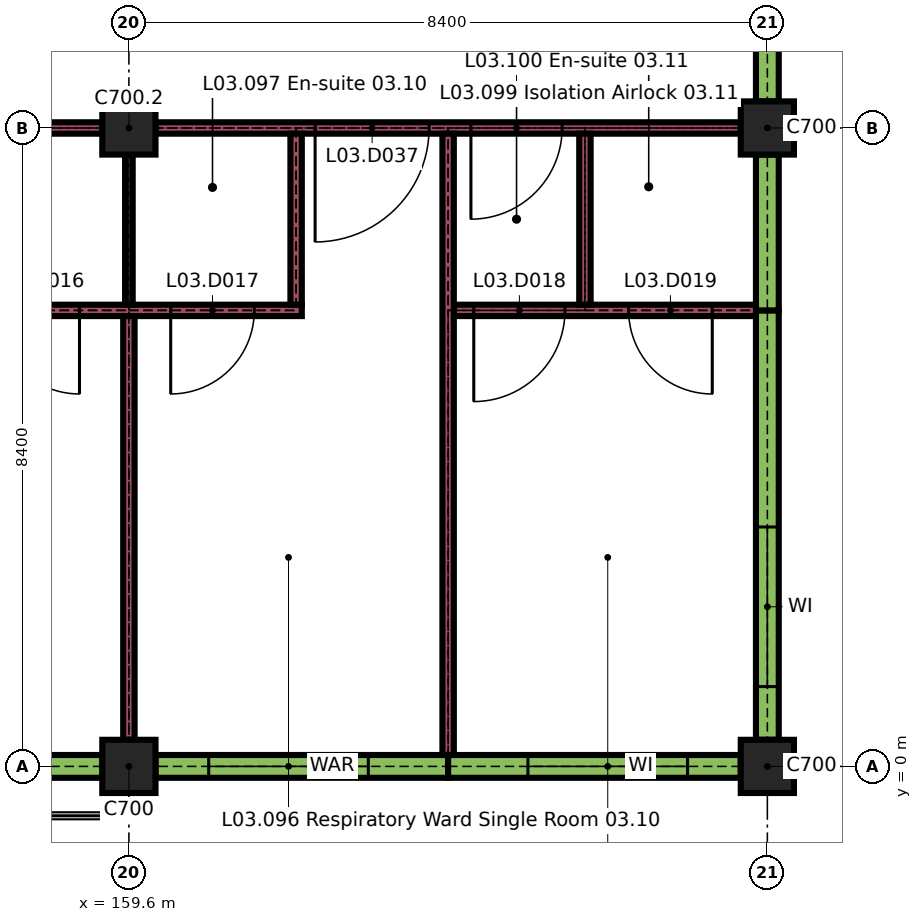
"""IFC4 building model, lengths in metres.
Left out: names, types, materials, properties, quantities, classifications, styles, units other than length and angle.
Written with IfcOpenShell. Run it as: python <this file> out.ifc"""

import sys

from ifc_helpers import new_model, si_unit, direction, frame, frame_2d, origin, origin_2d, place, context, subcontext, project, spatial, rectangle, extrude, element, fill, save


model = new_model("IFC4")
c1 = context("Model", 3, precision=1e-05, world=origin(), true_north=direction((0.0, 1.0)))
c2 = subcontext(c1, "Body", "Model", "MODEL_VIEW")
j1 = project(units=[si_unit("LENGTHUNIT", "METRE"), si_unit("PLANEANGLEUNIT", "RADIAN")], contexts=[c1])
p1 = place(None, origin())
s1 = spatial("IfcSite", under=j1, at=p1, CompositionType="ELEMENT")
p2 = place(p1, origin())
s2 = spatial("IfcBuilding", under=s1, at=p2, CompositionType="ELEMENT")
p3 = place(p2, frame((0.0, 0.0, 15.3)))
s3 = spatial("IfcBuildingStorey", under=s2, at=p3, CompositionType="ELEMENT", Elevation=15.3)
for number, where, z_axis, x_axis in (
    (1, (159.6, 0.0, 0.0), (0.0, 0.0, 1.0), (1.0, 0.0, 0.0)),
    (2, (168.0, 0.0, 0.0), (0.0, 0.0, 1.0), (1.0, 0.0, 0.0)),
    (3, (159.6, 8.4, 0.0), (0.0, 0.0, 1.0), (1.0, 0.0, 0.0)),
    (4, (168.0, 8.4, 0.0), (0.0, 0.0, 1.0), (1.0, 0.0, 0.0)),
):
    element("IfcColumn", number, at=place(p3, frame(where, z_axis=z_axis, x_axis=x_axis)), inside=s3, PredefinedType="COLUMN", context=c2, shape_type="SweptSolid", body=[
        extrude(rectangle(XDim=0.7, YDim=0.7, at=origin_2d()), origin(), (0.0, 0.0, 1.0), 3.26),
    ])
p4 = place(p3, frame((155.4, 0.0, 0.0), z_axis=(0.0, 0.0, 1.0), x_axis=(1.0, 0.0, 0.0)))
e5 = element("IfcWall", 5, at=p4, inside=s3, PredefinedType="SOLIDWALL", context=c2, shape_type="SweptSolid", body=[
    extrude(rectangle(XDim=3.85, YDim=0.3, at=frame_2d((1.925, 0.0))), origin(), (0.0, 0.0, 1.0), 2.96),
])
p5 = place(p4, frame((1.05, 0.0, 0.9)))
e6 = element("IfcOpeningElement", 6, at=p5, cuts=e5, PredefinedType="OPENING", context=c2, shape_type="SweptSolid", body=[
    extrude(rectangle(XDim=2.1, YDim=1.5, at=frame_2d((1.05, 0.75))), frame((0.0, 0.16, 0.0), z_axis=(0.0, -1.0, 0.0), x_axis=(1.0, 0.0, 0.0)), (0.0, 0.0, 1.0), 0.32),
])
p6 = place(p3, frame((159.95, 0.0, 0.0), z_axis=(0.0, 0.0, 1.0), x_axis=(1.0, 0.0, 0.0)))
e7 = element("IfcWall", 7, at=p6, inside=s3, PredefinedType="SOLIDWALL", context=c2, shape_type="SweptSolid", body=[
    extrude(rectangle(XDim=3.85, YDim=0.3, at=frame_2d((1.925, 0.0))), origin(), (0.0, 0.0, 1.0), 2.96),
])
p7 = place(p6, frame((0.7, 0.0, 0.9)))
e8 = element("IfcOpeningElement", 8, at=p7, cuts=e7, PredefinedType="OPENING", context=c2, shape_type="SweptSolid", body=[
    extrude(rectangle(XDim=2.1, YDim=1.5, at=frame_2d((1.05, 0.75))), frame((0.0, 0.16, 0.0), z_axis=(0.0, -1.0, 0.0), x_axis=(1.0, 0.0, 0.0)), (0.0, 0.0, 1.0), 0.32),
])
p8 = place(p3, frame((163.8, 0.0, 0.0), z_axis=(0.0, 0.0, 1.0), x_axis=(1.0, 0.0, 0.0)))
e9 = element("IfcWall", 9, at=p8, inside=s3, PredefinedType="SOLIDWALL", context=c2, shape_type="SweptSolid", body=[
    extrude(rectangle(XDim=3.85, YDim=0.3, at=frame_2d((1.925, 0.0))), origin(), (0.0, 0.0, 1.0), 2.96),
])
p9 = place(p8, frame((1.05, 0.0, 0.9)))
e10 = element("IfcOpeningElement", 10, at=p9, cuts=e9, PredefinedType="OPENING", context=c2, shape_type="SweptSolid", body=[
    extrude(rectangle(XDim=2.1, YDim=1.5, at=frame_2d((1.05, 0.75))), frame((0.0, 0.16, 0.0), z_axis=(0.0, -1.0, 0.0), x_axis=(1.0, 0.0, 0.0)), (0.0, 0.0, 1.0), 0.32),
])
p10 = place(p3, frame((168.0, 0.35, 0.0), z_axis=(0.0, 0.0, 1.0), x_axis=(0.0, 1.0, 0.0)))
e11 = element("IfcWall", 11, at=p10, inside=s3, PredefinedType="SOLIDWALL", context=c2, shape_type="SweptSolid", body=[
    extrude(rectangle(XDim=5.65, YDim=0.3, at=frame_2d((2.825, 0.0))), origin(), (0.0, 0.0, 1.0), 2.96),
])
p11 = place(p10, frame((0.7, 0.0, 0.9)))
e12 = element("IfcOpeningElement", 12, at=p11, cuts=e11, PredefinedType="OPENING", context=c2, shape_type="SweptSolid", body=[
    extrude(rectangle(XDim=2.1, YDim=1.5, at=frame_2d((1.05, 0.75))), frame((0.0, 0.16, 0.0), z_axis=(0.0, -1.0, 0.0), x_axis=(1.0, 0.0, 0.0)), (0.0, 0.0, 1.0), 0.32),
])
p12 = place(p3, frame((168.0, 6.0, 0.0), z_axis=(0.0, 0.0, 1.0), x_axis=(0.0, 1.0, 0.0)))
e13 = element("IfcWall", 13, at=p12, inside=s3, PredefinedType="SOLIDWALL", context=c2, shape_type="SweptSolid", body=[
    extrude(rectangle(XDim=2.05, YDim=0.3, at=frame_2d((1.025, 0.0))), origin(), (0.0, 0.0, 1.0), 2.96),
])
p13 = place(p3, frame((168.0, 8.75, 0.0), z_axis=(0.0, 0.0, 1.0), x_axis=(0.0, 1.0, 0.0)))
e14 = element("IfcWall", 14, at=p13, inside=s3, PredefinedType="SOLIDWALL", context=c2, shape_type="SweptSolid", body=[
    extrude(rectangle(XDim=2.65, YDim=0.3, at=frame_2d((1.325, 0.0))), origin(), (0.0, 0.0, 1.0), 2.96),
])
p14 = place(p13, frame((1.3, 0.0, 0.9)))
e15 = element("IfcOpeningElement", 15, at=p14, cuts=e14, PredefinedType="OPENING", context=c2, shape_type="SweptSolid", body=[
    extrude(rectangle(XDim=0.9, YDim=1.5, at=frame_2d((0.45, 0.75))), frame((0.0, 0.16, 0.0), z_axis=(0.0, -1.0, 0.0), x_axis=(1.0, 0.0, 0.0)), (0.0, 0.0, 1.0), 0.32),
])
p15 = place(p3, frame((155.475, 6.0, 0.0), z_axis=(0.0, 0.0, 1.0), x_axis=(1.0, 0.0, 0.0)))
e16 = element("IfcWall", 16, at=p15, inside=s3, PredefinedType="PARTITIONING", context=c2, shape_type="SweptSolid", body=[
    extrude(rectangle(XDim=6.4, YDim=0.15, at=frame_2d((3.2, 0.0))), origin(), (0.0, 0.0, 1.0), 3.26),
])
p16 = place(p15, frame((0.262, 0.0, 0.0)))
e17 = element("IfcOpeningElement", 17, at=p16, cuts=e16, PredefinedType="OPENING", context=c2, shape_type="SweptSolid", body=[
    extrude(rectangle(XDim=1.2, YDim=2.1, at=frame_2d((0.6, 1.05))), frame((0.0, 0.085, 0.0), z_axis=(0.0, -1.0, 0.0), x_axis=(1.0, 0.0, 0.0)), (0.0, 0.0, 1.0), 0.17),
])
p17 = place(p15, frame((2.375, 0.0, 0.0)))
e18 = element("IfcOpeningElement", 18, at=p17, cuts=e16, PredefinedType="OPENING", context=c2, shape_type="SweptSolid", body=[
    extrude(rectangle(XDim=1.1, YDim=2.1, at=frame_2d((0.55, 1.05))), frame((0.0, 0.085, 0.0), z_axis=(0.0, -1.0, 0.0), x_axis=(1.0, 0.0, 0.0)), (0.0, 0.0, 1.0), 0.17),
])
p18 = place(p15, frame((4.675, 0.0, 0.0)))
e19 = element("IfcOpeningElement", 19, at=p18, cuts=e16, PredefinedType="OPENING", context=c2, shape_type="SweptSolid", body=[
    extrude(rectangle(XDim=1.1, YDim=2.1, at=frame_2d((0.55, 1.05))), frame((0.0, 0.085, 0.0), z_axis=(0.0, -1.0, 0.0), x_axis=(1.0, 0.0, 0.0)), (0.0, 0.0, 1.0), 0.17),
])
p19 = place(p3, frame((163.875, 6.0, 0.0), z_axis=(0.0, 0.0, 1.0), x_axis=(1.0, 0.0, 0.0)))
e20 = element("IfcWall", 20, at=p19, inside=s3, PredefinedType="PARTITIONING", context=c2, shape_type="SweptSolid", body=[
    extrude(rectangle(XDim=3.975, YDim=0.15, at=frame_2d((1.988, 0.0))), origin(), (0.0, 0.0, 1.0), 3.26),
])
p20 = place(p19, frame((0.262, 0.0, 0.0)))
e21 = element("IfcOpeningElement", 21, at=p20, cuts=e20, PredefinedType="OPENING", context=c2, shape_type="SweptSolid", body=[
    extrude(rectangle(XDim=1.2, YDim=2.1, at=frame_2d((0.6, 1.05))), frame((0.0, 0.085, 0.0), z_axis=(0.0, -1.0, 0.0), x_axis=(1.0, 0.0, 0.0)), (0.0, 0.0, 1.0), 0.17),
])
p21 = place(p19, frame((2.3, 0.0, 0.0)))
e22 = element("IfcOpeningElement", 22, at=p21, cuts=e20, PredefinedType="OPENING", context=c2, shape_type="SweptSolid", body=[
    extrude(rectangle(XDim=1.1, YDim=2.1, at=frame_2d((0.55, 1.05))), frame((0.0, 0.085, 0.0), z_axis=(0.0, -1.0, 0.0), x_axis=(1.0, 0.0, 0.0)), (0.0, 0.0, 1.0), 0.17),
])
p22 = place(p3, frame((155.325, 8.4, 0.0), z_axis=(0.0, 0.0, 1.0), x_axis=(1.0, 0.0, 0.0)))
e23 = element("IfcWall", 23, at=p22, inside=s3, PredefinedType="PARTITIONING", context=c2, shape_type="SweptSolid", body=[
    extrude(rectangle(XDim=3.925, YDim=0.15, at=frame_2d((1.962, 0.0))), origin(), (0.0, 0.0, 1.0), 3.26),
])
p23 = place(p22, frame((0.375, 0.0, 0.0)))
e24 = element("IfcOpeningElement", 24, at=p23, cuts=e23, PredefinedType="OPENING", context=c2, shape_type="SweptSolid", body=[
    extrude(rectangle(XDim=1.2, YDim=2.1, at=frame_2d((0.6, 1.05))), frame((0.0, 0.085, 0.0), z_axis=(0.0, -1.0, 0.0), x_axis=(1.0, 0.0, 0.0)), (0.0, 0.0, 1.0), 0.17),
])
p24 = place(p3, frame((159.95, 8.4, 0.0), z_axis=(0.0, 0.0, 1.0), x_axis=(1.0, 0.0, 0.0)))
e25 = element("IfcWall", 25, at=p24, inside=s3, PredefinedType="PARTITIONING", context=c2, shape_type="SweptSolid", body=[
    extrude(rectangle(XDim=7.7, YDim=0.15, at=frame_2d((3.85, 0.0))), origin(), (0.0, 0.0, 1.0), 3.26),
])
p25 = place(p24, frame((2.1, 0.0, 0.0)))
e26 = element("IfcOpeningElement", 26, at=p25, cuts=e25, PredefinedType="OPENING", context=c2, shape_type="SweptSolid", body=[
    extrude(rectangle(XDim=1.5, YDim=2.4, at=frame_2d((0.75, 1.2))), frame((0.0, 0.085, 0.0), z_axis=(0.0, -1.0, 0.0), x_axis=(1.0, 0.0, 0.0)), (0.0, 0.0, 1.0), 0.17),
])
p26 = place(p24, frame((4.15, 0.0, 0.0)))
e27 = element("IfcOpeningElement", 27, at=p26, cuts=e25, PredefinedType="OPENING", context=c2, shape_type="SweptSolid", body=[
    extrude(rectangle(XDim=1.2, YDim=2.1, at=frame_2d((0.6, 1.05))), frame((0.0, 0.085, 0.0), z_axis=(0.0, -1.0, 0.0), x_axis=(1.0, 0.0, 0.0)), (0.0, 0.0, 1.0), 0.17),
])
p27 = place(p3, frame((159.6, 0.35, 0.0), z_axis=(0.0, 0.0, 1.0), x_axis=(0.0, 1.0, 0.0)))
e28 = element("IfcWall", 28, at=p27, inside=s3, PredefinedType="PARTITIONING", context=c2, shape_type="SweptSolid", body=[
    extrude(rectangle(XDim=5.575, YDim=0.15, at=frame_2d((2.788, 0.0))), origin(), (0.0, 0.0, 1.0), 3.26),
])
p28 = place(p3, frame((159.6, 6.075, 0.0), z_axis=(0.0, 0.0, 1.0), x_axis=(0.0, 1.0, 0.0)))
e29 = element("IfcWall", 29, at=p28, inside=s3, PredefinedType="PARTITIONING", context=c2, shape_type="SweptSolid", body=[
    extrude(rectangle(XDim=1.975, YDim=0.1, at=frame_2d((0.988, 0.0))), origin(), (0.0, 0.0, 1.0), 3.26),
])
p29 = place(p3, frame((161.8, 6.075, 0.0), z_axis=(0.0, 0.0, 1.0), x_axis=(0.0, 1.0, 0.0)))
e30 = element("IfcWall", 30, at=p29, inside=s3, PredefinedType="PARTITIONING", context=c2, shape_type="SweptSolid", body=[
    extrude(rectangle(XDim=2.25, YDim=0.15, at=frame_2d((1.125, 0.0))), origin(), (0.0, 0.0, 1.0), 3.26),
])
p30 = place(p3, frame((163.8, 0.15, 0.0), z_axis=(0.0, 0.0, 1.0), x_axis=(0.0, 1.0, 0.0)))
e31 = element("IfcWall", 31, at=p30, inside=s3, PredefinedType="PARTITIONING", context=c2, shape_type="SweptSolid", body=[
    extrude(rectangle(XDim=8.175, YDim=0.15, at=frame_2d((4.087, 0.0))), origin(), (0.0, 0.0, 1.0), 3.26),
])
p31 = place(p3, frame((165.6, 6.075, 0.0), z_axis=(0.0, 0.0, 1.0), x_axis=(0.0, 1.0, 0.0)))
e32 = element("IfcWall", 32, at=p31, inside=s3, PredefinedType="PARTITIONING", context=c2, shape_type="SweptSolid", body=[
    extrude(rectangle(XDim=2.25, YDim=0.15, at=frame_2d((1.125, 0.0))), origin(), (0.0, 0.0, 1.0), 3.26),
])
p32 = place(p7, origin())
e33 = element("IfcWindow", 33, at=p32, inside=s3, PartitioningType="DOUBLE_PANEL_VERTICAL", PredefinedType="WINDOW", context=c2, shape_type="SweptSolid", body=[
    extrude(rectangle(XDim=2.1, YDim=1.5, at=frame_2d((1.05, 0.75))), frame((0.0, 0.05, 0.0), z_axis=(0.0, -1.0, 0.0), x_axis=(1.0, 0.0, 0.0)), (0.0, 0.0, 1.0), 0.1),
])
fill(e8, e33)
p33 = place(p9, origin())
e34 = element("IfcWindow", 34, at=p33, inside=s3, PartitioningType="SINGLE_PANEL", PredefinedType="WINDOW", context=c2, shape_type="SweptSolid", body=[
    extrude(rectangle(XDim=2.1, YDim=1.5, at=frame_2d((1.05, 0.75))), frame((0.0, 0.045, 0.0), z_axis=(0.0, -1.0, 0.0), x_axis=(1.0, 0.0, 0.0)), (0.0, 0.0, 1.0), 0.09),
])
fill(e10, e34)
p34 = place(p11, origin())
e35 = element("IfcWindow", 35, at=p34, inside=s3, PartitioningType="SINGLE_PANEL", PredefinedType="WINDOW", context=c2, shape_type="SweptSolid", body=[
    extrude(rectangle(XDim=2.1, YDim=1.5, at=frame_2d((1.05, 0.75))), frame((0.0, 0.045, 0.0), z_axis=(0.0, -1.0, 0.0), x_axis=(1.0, 0.0, 0.0)), (0.0, 0.0, 1.0), 0.09),
])
fill(e12, e35)
p35 = place(p17, origin())
e36 = element("IfcDoor", 36, at=p35, inside=s3, OperationType="SINGLE_SWING_RIGHT", PredefinedType="DOOR", context=c2, shape_type="SweptSolid", body=[
    extrude(rectangle(XDim=1.1, YDim=2.1, at=frame_2d((0.55, 1.05))), frame((0.0, 0.025, 0.0), z_axis=(0.0, -1.0, 0.0), x_axis=(1.0, 0.0, 0.0)), (0.0, 0.0, 1.0), 0.05),
])
fill(e18, e36)
p36 = place(p18, origin())
e37 = element("IfcDoor", 37, at=p36, inside=s3, OperationType="SINGLE_SWING_LEFT", PredefinedType="DOOR", context=c2, shape_type="SweptSolid", body=[
    extrude(rectangle(XDim=1.1, YDim=2.1, at=frame_2d((0.55, 1.05))), frame((0.0, 0.025, 0.0), z_axis=(0.0, -1.0, 0.0), x_axis=(1.0, 0.0, 0.0)), (0.0, 0.0, 1.0), 0.05),
])
fill(e19, e37)
p37 = place(p20, origin())
e38 = element("IfcDoor", 38, at=p37, inside=s3, OperationType="SINGLE_SWING_LEFT", PredefinedType="DOOR", context=c2, shape_type="SweptSolid", body=[
    extrude(rectangle(XDim=1.2, YDim=2.1, at=frame_2d((0.6, 1.05))), frame((0.0, 0.05, 0.0), z_axis=(0.0, -1.0, 0.0), x_axis=(1.0, 0.0, 0.0)), (0.0, 0.0, 1.0), 0.1),
])
fill(e21, e38)
p38 = place(p21, origin())
e39 = element("IfcDoor", 39, at=p38, inside=s3, OperationType="SINGLE_SWING_RIGHT", PredefinedType="DOOR", context=c2, shape_type="SweptSolid", body=[
    extrude(rectangle(XDim=1.1, YDim=2.1, at=frame_2d((0.55, 1.05))), frame((0.0, 0.025, 0.0), z_axis=(0.0, -1.0, 0.0), x_axis=(1.0, 0.0, 0.0)), (0.0, 0.0, 1.0), 0.05),
])
fill(e22, e39)
p39 = place(p25, origin())
e40 = element("IfcDoor", 40, at=p39, inside=s3, OperationType="SINGLE_SWING_LEFT", PredefinedType="DOOR", context=c2, shape_type="SweptSolid", body=[
    extrude(rectangle(XDim=1.5, YDim=2.4, at=frame_2d((0.75, 1.2))), frame((0.0, 0.03, 0.0), z_axis=(0.0, -1.0, 0.0), x_axis=(1.0, 0.0, 0.0)), (0.0, 0.0, 1.0), 0.06),
])
fill(e26, e40)
p40 = place(p26, origin())
e41 = element("IfcDoor", 41, at=p40, inside=s3, OperationType="SINGLE_SWING_LEFT", PredefinedType="DOOR", context=c2, shape_type="SweptSolid", body=[
    extrude(rectangle(XDim=1.2, YDim=2.1, at=frame_2d((0.6, 1.05))), frame((0.0, 0.05, 0.0), z_axis=(0.0, -1.0, 0.0), x_axis=(1.0, 0.0, 0.0)), (0.0, 0.0, 1.0), 0.1),
])
fill(e27, e41)
save(model, sys.argv[1])
